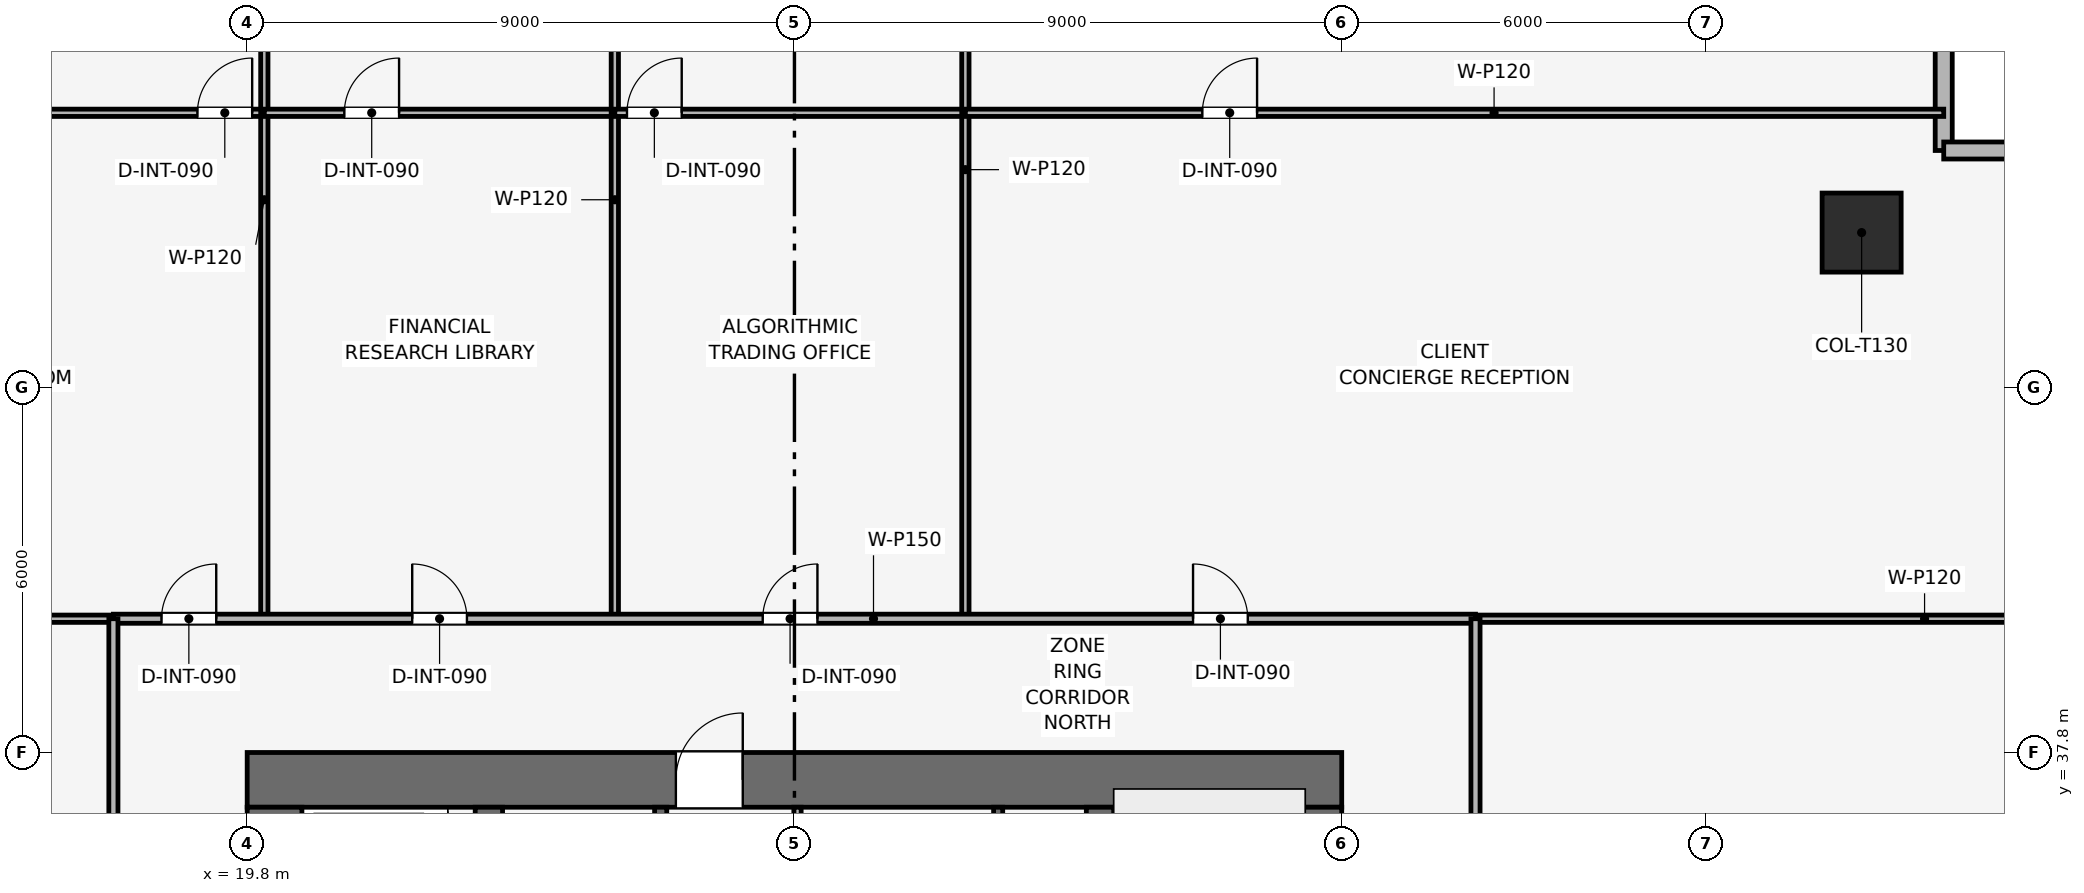
"""IFC4 building model, lengths in metres.
Left out: names, types, materials, properties, quantities, classifications, styles, units other than length and angle.
Written with IfcOpenShell. Run it as: python <this file> out.ifc"""

import sys

from ifc_helpers import new_model, si_unit, direction, frame, frame_2d, origin, origin_2d, place, context, subcontext, project, spatial, rectangle, extrude, element, fill, save


model = new_model("IFC4")
c1 = context("Model", 3, precision=1e-05, world=origin(), true_north=direction((0.0, 1.0)))
c2 = subcontext(c1, "Body", "Model", "MODEL_VIEW")
j1 = project(units=[si_unit("LENGTHUNIT", "METRE"), si_unit("PLANEANGLEUNIT", "RADIAN")], contexts=[c1])
p1 = place(None, origin())
s1 = spatial("IfcSite", under=j1, at=p1, CompositionType="ELEMENT")
p2 = place(p1, origin())
s2 = spatial("IfcBuilding", under=s1, at=p2, CompositionType="ELEMENT")
p3 = place(p2, frame((0.0, 0.0, 117.3)))
s3 = spatial("IfcBuildingStorey", under=s2, at=p3, CompositionType="ELEMENT", Elevation=117.3)
p4 = place(p3, frame((19.8, 37.35, 0.0), z_axis=(0.0, 0.0, 1.0), x_axis=(1.0, 0.0, 0.0)))
e1 = element("IfcWall", 1, at=p4, inside=s3, PredefinedType="SHEAR", context=c2, shape_type="SweptSolid", body=[
    extrude(rectangle(XDim=18.0, YDim=0.9, at=frame_2d((9.0, 0.0))), origin(), (0.0, 0.0, 1.0), 3.9),
])
p5 = place(p4, frame((7.05, 0.0, 0.0)))
e2 = element("IfcOpeningElement", 2, at=p5, cuts=e1, PredefinedType="OPENING", context=c2, shape_type="SweptSolid", body=[
    extrude(rectangle(XDim=1.1, YDim=2.15, at=frame_2d((0.55, 1.075))), frame((0.0, 0.46, 0.0), z_axis=(0.0, -1.0, 0.0), x_axis=(1.0, 0.0, 0.0)), (0.0, 0.0, 1.0), 0.92),
])
p6 = place(p3, frame((20.25, 20.7, 0.0), z_axis=(0.0, 0.0, 1.0), x_axis=(0.0, 1.0, 0.0)))
e3 = element("IfcWall", 3, at=p6, inside=s3, PredefinedType="SHEAR", context=c2, shape_type="SweptSolid", body=[
    extrude(rectangle(XDim=16.2, YDim=0.9, at=frame_2d((8.1, 0.0))), origin(), (0.0, 0.0, 1.0), 3.9),
])
p7 = place(p6, frame((10.1, 0.0, 0.0)))
e4 = element("IfcOpeningElement", 4, at=p7, cuts=e3, PredefinedType="OPENING", context=c2, shape_type="SweptSolid", body=[
    extrude(rectangle(XDim=1.1, YDim=2.15, at=frame_2d((0.55, 1.075))), frame((0.0, 0.46, 0.0), z_axis=(0.0, -1.0, 0.0), x_axis=(1.0, 0.0, 0.0)), (0.0, 0.0, 1.0), 0.92),
])
p8 = place(p3, frame((37.35, 20.7, 0.0), z_axis=(0.0, 0.0, 1.0), x_axis=(0.0, 1.0, 0.0)))
e5 = element("IfcWall", 5, at=p8, inside=s3, PredefinedType="SHEAR", context=c2, shape_type="SweptSolid", body=[
    extrude(rectangle(XDim=16.2, YDim=0.9, at=frame_2d((8.1, 0.0))), origin(), (0.0, 0.0, 1.0), 3.9),
])
p9 = place(p8, frame((4.6, 0.0, 0.0)))
e6 = element("IfcOpeningElement", 6, at=p9, cuts=e5, PredefinedType="OPENING", context=c2, shape_type="SweptSolid", body=[
    extrude(rectangle(XDim=1.1, YDim=2.15, at=frame_2d((0.55, 1.075))), frame((0.0, 0.46, 0.0), z_axis=(0.0, -1.0, 0.0), x_axis=(1.0, 0.0, 0.0)), (0.0, 0.0, 1.0), 0.92),
])
for number, where, z_axis, x_axis in (
    (7, (23.775, 20.7, 0.0), (0.0, 0.0, 1.0), (0.0, 1.0, 0.0)),
    (8, (33.825, 20.7, 0.0), (0.0, 0.0, 1.0), (0.0, 1.0, 0.0)),
):
    element("IfcWall", number, at=place(p3, frame(where, z_axis=z_axis, x_axis=x_axis)), inside=s3, PredefinedType="SHEAR", context=c2, shape_type="SweptSolid", body=[
        extrude(rectangle(XDim=16.2, YDim=0.45, at=frame_2d((8.1, 0.0))), origin(), (0.0, 0.0, 1.0), 3.9),
    ])
p10 = place(p3, frame((46.35, 46.35, 0.003), z_axis=(0.0, 0.0, 1.0), x_axis=(1.0, 0.0, 0.0)))
e9 = element("IfcColumn", 9, at=p10, inside=s3, PredefinedType="COLUMN", context=c2, shape_type="SweptSolid", body=[
    extrude(rectangle(XDim=1.3, YDim=1.3, at=origin_2d()), origin(), (0.0, 0.0, 1.0), 3.644),
])
p11 = place(p3, frame((47.7, 54.77, 0.0), z_axis=(0.0, 0.0, 1.0), x_axis=(0.0, -1.0, 0.0)))
e10 = element("IfcWall", 10, at=p11, inside=s3, PredefinedType="SOLIDWALL", context=c2, shape_type="SweptSolid", body=[
    extrude(rectangle(XDim=7.07, YDim=0.28, at=frame_2d((3.535, 0.0))), origin(), (0.0, 0.0, 1.0), 3.65),
])
p12 = place(p11, frame((2.285, 0.0, 0.9)))
e11 = element("IfcOpeningElement", 11, at=p12, cuts=e10, PredefinedType="OPENING", context=c2, shape_type="SweptSolid", body=[
    extrude(rectangle(XDim=2.5, YDim=1.9, at=frame_2d((1.25, 0.95))), frame((0.0, 0.15, 0.0), z_axis=(0.0, -1.0, 0.0), x_axis=(1.0, 0.0, 0.0)), (0.0, 0.0, 1.0), 0.3),
])
p13 = place(p3, frame((47.7, 47.7, 0.0), z_axis=(0.0, 0.0, 1.0), x_axis=(1.0, 0.0, 0.0)))
e12 = element("IfcWall", 12, at=p13, inside=s3, PredefinedType="SOLIDWALL", context=c2, shape_type="SweptSolid", body=[
    extrude(rectangle(XDim=7.07, YDim=0.28, at=frame_2d((3.535, 0.0))), origin(), (0.0, 0.0, 1.0), 3.65),
])
p14 = place(p13, frame((2.285, 0.0, 0.9)))
e13 = element("IfcOpeningElement", 13, at=p14, cuts=e12, PredefinedType="OPENING", context=c2, shape_type="SweptSolid", body=[
    extrude(rectangle(XDim=2.5, YDim=1.9, at=frame_2d((1.25, 0.95))), frame((0.0, 0.15, 0.0), z_axis=(0.0, -1.0, 0.0), x_axis=(1.0, 0.0, 0.0)), (0.0, 0.0, 1.0), 0.3),
])
p15 = place(p3, frame((32.15, 34.0, 0.0), z_axis=(0.0, 0.0, 1.0), x_axis=(0.0, 1.0, 0.0)))
e14 = element("IfcWall", 14, at=p15, inside=s3, PredefinedType="SHEAR", context=c2, shape_type="SweptSolid", body=[
    extrude(rectangle(XDim=2.9, YDim=0.15, at=frame_2d((1.45, 0.0))), origin(), (0.0, 0.0, 1.0), 3.65),
])
p16 = place(p3, frame((26.6, 34.0, 0.0), z_axis=(0.0, 0.0, 1.0), x_axis=(0.0, 1.0, 0.0)))
e15 = element("IfcWall", 15, at=p16, inside=s3, PredefinedType="SHEAR", context=c2, shape_type="SweptSolid", body=[
    extrude(rectangle(XDim=2.9, YDim=0.2, at=frame_2d((1.45, 0.0))), origin(), (0.0, 0.0, 1.0), 3.65),
])
p17 = place(p16, frame((0.75, 0.0, 0.0)))
e16 = element("IfcOpeningElement", 16, at=p17, cuts=e15, PredefinedType="OPENING", context=c2, shape_type="SweptSolid", body=[
    extrude(rectangle(XDim=1.1, YDim=2.15, at=frame_2d((0.55, 1.075))), frame((0.0, 0.11, 0.0), z_axis=(0.0, -1.0, 0.0), x_axis=(1.0, 0.0, 0.0)), (0.0, 0.0, 1.0), 0.22),
])
p18 = place(p3, frame((28.85, 33.925, 0.0), z_axis=(0.0, 0.0, 1.0), x_axis=(0.0, 1.0, 0.0)))
e17 = element("IfcWall", 17, at=p18, inside=s3, PredefinedType="PARTITIONING", context=c2, shape_type="SweptSolid", body=[
    extrude(rectangle(XDim=2.975, YDim=0.12, at=frame_2d((1.487, 0.0))), origin(), (0.0, 0.0, 1.0), 3.65),
])
p19 = place(p18, frame((0.25, 0.0, 0.0)))
e18 = element("IfcOpeningElement", 18, at=p19, cuts=e17, PredefinedType="OPENING", context=c2, shape_type="SweptSolid", body=[
    extrude(rectangle(XDim=0.85, YDim=2.1, at=frame_2d((0.425, 1.05))), frame((0.0, 0.07, 0.0), z_axis=(0.0, -1.0, 0.0), x_axis=(1.0, 0.0, 0.0)), (0.0, 0.0, 1.0), 0.14),
])
p20 = place(p18, frame((1.645, 0.0, 0.0)))
e19 = element("IfcOpeningElement", 19, at=p20, cuts=e17, PredefinedType="OPENING", context=c2, shape_type="SweptSolid", body=[
    extrude(rectangle(XDim=0.85, YDim=2.1, at=frame_2d((0.425, 1.05))), frame((0.0, 0.07, 0.0), z_axis=(0.0, -1.0, 0.0), x_axis=(1.0, 0.0, 0.0)), (0.0, 0.0, 1.0), 0.14),
])
p21 = place(p3, frame((9.9, 48.32, 0.0), z_axis=(0.0, 0.0, 1.0), x_axis=(1.0, 0.0, 0.0)))
e20 = element("IfcWall", 20, at=p21, inside=s3, PredefinedType="PARTITIONING", context=c2, shape_type="SweptSolid", body=[
    extrude(rectangle(XDim=10.182, YDim=0.12, at=frame_2d((5.091, 0.0))), origin(), (0.0, 0.0, 1.0), 3.035),
])
p22 = place(p21, frame((9.082, 0.0, 0.0)))
e21 = element("IfcOpeningElement", 21, at=p22, cuts=e20, PredefinedType="OPENING", context=c2, shape_type="SweptSolid", body=[
    extrude(rectangle(XDim=0.9, YDim=2.1, at=frame_2d((0.45, 1.05))), frame((0.0, 0.07, 0.0), z_axis=(0.0, -1.0, 0.0), x_axis=(1.0, 0.0, 0.0)), (0.0, 0.0, 1.0), 0.14),
])
p23 = place(p3, frame((20.082, 40.0, 0.0), z_axis=(0.0, 0.0, 1.0), x_axis=(0.0, 1.0, 0.0)))
e22 = element("IfcWall", 22, at=p23, inside=s3, PredefinedType="PARTITIONING", context=c2, shape_type="SweptSolid", body=[
    extrude(rectangle(XDim=14.77, YDim=0.12, at=frame_2d((7.385, 0.0))), origin(), (0.0, 0.0, 1.0), 3.035),
])
p24 = place(p3, frame((20.082, 48.32, 0.0), z_axis=(0.0, 0.0, 1.0), x_axis=(1.0, 0.0, 0.0)))
e23 = element("IfcWall", 23, at=p24, inside=s3, PredefinedType="PARTITIONING", context=c2, shape_type="SweptSolid", body=[
    extrude(rectangle(XDim=5.764, YDim=0.12, at=frame_2d((2.882, 0.0))), origin(), (0.0, 0.0, 1.0), 3.185),
])
p25 = place(p24, frame((1.316, 0.0, 0.0)))
e24 = element("IfcOpeningElement", 24, at=p25, cuts=e23, PredefinedType="OPENING", context=c2, shape_type="SweptSolid", body=[
    extrude(rectangle(XDim=0.9, YDim=2.1, at=frame_2d((0.45, 1.05))), frame((0.0, 0.07, 0.0), z_axis=(0.0, -1.0, 0.0), x_axis=(1.0, 0.0, 0.0)), (0.0, 0.0, 1.0), 0.14),
])
p26 = place(p3, frame((25.846, 40.0, 0.0), z_axis=(0.0, 0.0, 1.0), x_axis=(0.0, 1.0, 0.0)))
e25 = element("IfcWall", 25, at=p26, inside=s3, PredefinedType="PARTITIONING", context=c2, shape_type="SweptSolid", body=[
    extrude(rectangle(XDim=14.77, YDim=0.12, at=frame_2d((7.385, 0.0))), origin(), (0.0, 0.0, 1.0), 3.035),
])
p27 = place(p3, frame((25.846, 48.32, 0.0), z_axis=(0.0, 0.0, 1.0), x_axis=(1.0, 0.0, 0.0)))
e26 = element("IfcWall", 26, at=p27, inside=s3, PredefinedType="PARTITIONING", context=c2, shape_type="SweptSolid", body=[
    extrude(rectangle(XDim=5.765, YDim=0.12, at=frame_2d((2.883, 0.0))), origin(), (0.0, 0.0, 1.0), 3.185),
])
p28 = place(p27, frame((0.2, 0.0, 0.0)))
e27 = element("IfcOpeningElement", 27, at=p28, cuts=e26, PredefinedType="OPENING", context=c2, shape_type="SweptSolid", body=[
    extrude(rectangle(XDim=0.9, YDim=2.1, at=frame_2d((0.45, 1.05))), frame((0.0, 0.07, 0.0), z_axis=(0.0, -1.0, 0.0), x_axis=(1.0, 0.0, 0.0)), (0.0, 0.0, 1.0), 0.14),
])
p29 = place(p3, frame((31.611, 40.0, 0.0), z_axis=(0.0, 0.0, 1.0), x_axis=(0.0, 1.0, 0.0)))
e28 = element("IfcWall", 28, at=p29, inside=s3, PredefinedType="PARTITIONING", context=c2, shape_type="SweptSolid", body=[
    extrude(rectangle(XDim=14.77, YDim=0.12, at=frame_2d((7.385, 0.0))), origin(), (0.0, 0.0, 1.0), 3.035),
])
p30 = place(p3, frame((31.611, 48.32, 0.0), z_axis=(0.0, 0.0, 1.0), x_axis=(1.0, 0.0, 0.0)))
e29 = element("IfcWall", 29, at=p30, inside=s3, PredefinedType="PARTITIONING", context=c2, shape_type="SweptSolid", body=[
    extrude(rectangle(XDim=16.089, YDim=0.12, at=frame_2d((8.044, 0.0))), origin(), (0.0, 0.0, 1.0), 3.035),
])
p31 = place(p30, frame((3.897, 0.0, 0.0)))
e30 = element("IfcOpeningElement", 30, at=p31, cuts=e29, PredefinedType="OPENING", context=c2, shape_type="SweptSolid", body=[
    extrude(rectangle(XDim=0.9, YDim=2.1, at=frame_2d((0.45, 1.05))), frame((0.0, 0.07, 0.0), z_axis=(0.0, -1.0, 0.0), x_axis=(1.0, 0.0, 0.0)), (0.0, 0.0, 1.0), 0.14),
])
for number, where, z_axis, x_axis in (
    (31, (2.83, 40.0, 0.0), (0.0, 0.0, 1.0), (1.0, 0.0, 0.0)),
    (32, (40.0, 40.0, 0.0), (0.0, 0.0, 1.0), (1.0, 0.0, 0.0)),
):
    element("IfcWall", number, at=place(p3, frame(where, z_axis=z_axis, x_axis=x_axis)), inside=s3, PredefinedType="PARTITIONING", context=c2, shape_type="SweptSolid", body=[
        extrude(rectangle(XDim=14.77, YDim=0.12, at=frame_2d((7.385, 0.0))), origin(), (0.0, 0.0, 1.0), 3.035),
    ])
p32 = place(p3, frame((17.6, 40.0, 0.0), z_axis=(0.0, 0.0, 1.0), x_axis=(1.0, 0.0, 0.0)))
e33 = element("IfcWall", 33, at=p32, inside=s3, PredefinedType="PARTITIONING", context=c2, shape_type="SweptSolid", body=[
    extrude(rectangle(XDim=22.4, YDim=0.15, at=frame_2d((11.2, 0.0))), origin(), (0.0, 0.0, 1.0), 3.185),
])
p33 = place(p32, frame((0.791, 0.0, 0.0)))
e34 = element("IfcOpeningElement", 34, at=p33, cuts=e33, PredefinedType="OPENING", context=c2, shape_type="SweptSolid", body=[
    extrude(rectangle(XDim=0.9, YDim=2.1, at=frame_2d((0.45, 1.05))), frame((0.0, 0.085, 0.0), z_axis=(0.0, -1.0, 0.0), x_axis=(1.0, 0.0, 0.0)), (0.0, 0.0, 1.0), 0.17),
])
p34 = place(p32, frame((4.914, 0.0, 0.0)))
e35 = element("IfcOpeningElement", 35, at=p34, cuts=e33, PredefinedType="OPENING", context=c2, shape_type="SweptSolid", body=[
    extrude(rectangle(XDim=0.9, YDim=2.1, at=frame_2d((0.45, 1.05))), frame((0.0, 0.085, 0.0), z_axis=(0.0, -1.0, 0.0), x_axis=(1.0, 0.0, 0.0)), (0.0, 0.0, 1.0), 0.17),
])
p35 = place(p32, frame((10.678, 0.0, 0.0)))
e36 = element("IfcOpeningElement", 36, at=p35, cuts=e33, PredefinedType="OPENING", context=c2, shape_type="SweptSolid", body=[
    extrude(rectangle(XDim=0.9, YDim=2.1, at=frame_2d((0.45, 1.05))), frame((0.0, 0.085, 0.0), z_axis=(0.0, -1.0, 0.0), x_axis=(1.0, 0.0, 0.0)), (0.0, 0.0, 1.0), 0.17),
])
p36 = place(p32, frame((17.755, 0.0, 0.0)))
e37 = element("IfcOpeningElement", 37, at=p36, cuts=e33, PredefinedType="OPENING", context=c2, shape_type="SweptSolid", body=[
    extrude(rectangle(XDim=0.9, YDim=2.1, at=frame_2d((0.45, 1.05))), frame((0.0, 0.085, 0.0), z_axis=(0.0, -1.0, 0.0), x_axis=(1.0, 0.0, 0.0)), (0.0, 0.0, 1.0), 0.17),
])
p37 = place(p3, frame((17.6, 17.6, 0.0), z_axis=(0.0, 0.0, 1.0), x_axis=(0.0, 1.0, 0.0)))
e38 = element("IfcWall", 38, at=p37, inside=s3, PredefinedType="PARTITIONING", context=c2, shape_type="SweptSolid", body=[
    extrude(rectangle(XDim=22.4, YDim=0.15, at=frame_2d((11.2, 0.0))), origin(), (0.0, 0.0, 1.0), 3.185),
])
p38 = place(p37, frame((10.75, 0.0, 0.0)))
e39 = element("IfcOpeningElement", 39, at=p38, cuts=e38, PredefinedType="OPENING", context=c2, shape_type="SweptSolid", body=[
    extrude(rectangle(XDim=0.9, YDim=2.1, at=frame_2d((0.45, 1.05))), frame((0.0, 0.085, 0.0), z_axis=(0.0, -1.0, 0.0), x_axis=(1.0, 0.0, 0.0)), (0.0, 0.0, 1.0), 0.17),
])
p39 = place(p3, frame((40.0, 17.6, 0.0), z_axis=(0.0, 0.0, 1.0), x_axis=(0.0, 1.0, 0.0)))
e40 = element("IfcWall", 40, at=p39, inside=s3, PredefinedType="PARTITIONING", context=c2, shape_type="SweptSolid", body=[
    extrude(rectangle(XDim=22.4, YDim=0.15, at=frame_2d((11.2, 0.0))), origin(), (0.0, 0.0, 1.0), 3.185),
])
p40 = place(p39, frame((1.95, 0.0, 0.0)))
e41 = element("IfcOpeningElement", 41, at=p40, cuts=e40, PredefinedType="OPENING", context=c2, shape_type="SweptSolid", body=[
    extrude(rectangle(XDim=0.9, YDim=2.1, at=frame_2d((0.45, 1.05))), frame((0.0, 0.085, 0.0), z_axis=(0.0, -1.0, 0.0), x_axis=(1.0, 0.0, 0.0)), (0.0, 0.0, 1.0), 0.17),
])
p41 = place(p39, frame((5.75, 0.0, 0.0)))
e42 = element("IfcOpeningElement", 42, at=p41, cuts=e40, PredefinedType="OPENING", context=c2, shape_type="SweptSolid", body=[
    extrude(rectangle(XDim=0.9, YDim=2.1, at=frame_2d((0.45, 1.05))), frame((0.0, 0.085, 0.0), z_axis=(0.0, -1.0, 0.0), x_axis=(1.0, 0.0, 0.0)), (0.0, 0.0, 1.0), 0.17),
])
p42 = place(p39, frame((8.65, 0.0, 0.0)))
e43 = element("IfcOpeningElement", 43, at=p42, cuts=e40, PredefinedType="OPENING", context=c2, shape_type="SweptSolid", body=[
    extrude(rectangle(XDim=0.9, YDim=2.1, at=frame_2d((0.45, 1.05))), frame((0.0, 0.085, 0.0), z_axis=(0.0, -1.0, 0.0), x_axis=(1.0, 0.0, 0.0)), (0.0, 0.0, 1.0), 0.17),
])
p43 = place(p39, frame((11.4, 0.0, 0.0)))
e44 = element("IfcOpeningElement", 44, at=p43, cuts=e40, PredefinedType="OPENING", context=c2, shape_type="SweptSolid", body=[
    extrude(rectangle(XDim=0.95, YDim=2.1, at=frame_2d((0.475, 1.05))), frame((0.0, 0.085, 0.0), z_axis=(0.0, -1.0, 0.0), x_axis=(1.0, 0.0, 0.0)), (0.0, 0.0, 1.0), 0.17),
])
p44 = place(p39, frame((17.35, 0.0, 0.0)))
e45 = element("IfcOpeningElement", 45, at=p44, cuts=e40, PredefinedType="OPENING", context=c2, shape_type="SweptSolid", body=[
    extrude(rectangle(XDim=0.9, YDim=2.1, at=frame_2d((0.45, 1.05))), frame((0.0, 0.085, 0.0), z_axis=(0.0, -1.0, 0.0), x_axis=(1.0, 0.0, 0.0)), (0.0, 0.0, 1.0), 0.17),
])
p45 = place(p22, origin())
e46 = element("IfcDoor", 46, at=p45, inside=s3, OperationType="SINGLE_SWING_RIGHT", PredefinedType="DOOR", context=c2, shape_type="SweptSolid", body=[
    extrude(rectangle(XDim=0.9, YDim=2.1, at=frame_2d((0.45, 1.05))), frame((0.0, 0.025, 0.0), z_axis=(0.0, -1.0, 0.0), x_axis=(1.0, 0.0, 0.0)), (0.0, 0.0, 1.0), 0.05),
])
fill(e21, e46)
p46 = place(p25, origin())
e47 = element("IfcDoor", 47, at=p46, inside=s3, OperationType="SINGLE_SWING_RIGHT", PredefinedType="DOOR", context=c2, shape_type="SweptSolid", body=[
    extrude(rectangle(XDim=0.9, YDim=2.1, at=frame_2d((0.45, 1.05))), frame((0.0, 0.025, 0.0), z_axis=(0.0, -1.0, 0.0), x_axis=(1.0, 0.0, 0.0)), (0.0, 0.0, 1.0), 0.05),
])
fill(e24, e47)
p47 = place(p28, origin())
e48 = element("IfcDoor", 48, at=p47, inside=s3, OperationType="SINGLE_SWING_RIGHT", PredefinedType="DOOR", context=c2, shape_type="SweptSolid", body=[
    extrude(rectangle(XDim=0.9, YDim=2.1, at=frame_2d((0.45, 1.05))), frame((0.0, 0.025, 0.0), z_axis=(0.0, -1.0, 0.0), x_axis=(1.0, 0.0, 0.0)), (0.0, 0.0, 1.0), 0.05),
])
fill(e27, e48)
p48 = place(p31, origin())
e49 = element("IfcDoor", 49, at=p48, inside=s3, OperationType="SINGLE_SWING_RIGHT", PredefinedType="DOOR", context=c2, shape_type="SweptSolid", body=[
    extrude(rectangle(XDim=0.9, YDim=2.1, at=frame_2d((0.45, 1.05))), frame((0.0, 0.025, 0.0), z_axis=(0.0, -1.0, 0.0), x_axis=(1.0, 0.0, 0.0)), (0.0, 0.0, 1.0), 0.05),
])
fill(e30, e49)
p49 = place(p33, origin())
e50 = element("IfcDoor", 50, at=p49, inside=s3, OperationType="SINGLE_SWING_RIGHT", PredefinedType="DOOR", context=c2, shape_type="SweptSolid", body=[
    extrude(rectangle(XDim=0.9, YDim=2.1, at=frame_2d((0.45, 1.05))), frame((0.0, 0.025, 0.0), z_axis=(0.0, -1.0, 0.0), x_axis=(1.0, 0.0, 0.0)), (0.0, 0.0, 1.0), 0.05),
])
fill(e34, e50)
p50 = place(p34, origin())
e51 = element("IfcDoor", 51, at=p50, inside=s3, OperationType="SINGLE_SWING_LEFT", PredefinedType="DOOR", context=c2, shape_type="SweptSolid", body=[
    extrude(rectangle(XDim=0.9, YDim=2.1, at=frame_2d((0.45, 1.05))), frame((0.0, 0.025, 0.0), z_axis=(0.0, -1.0, 0.0), x_axis=(1.0, 0.0, 0.0)), (0.0, 0.0, 1.0), 0.05),
])
fill(e35, e51)
p51 = place(p35, origin())
e52 = element("IfcDoor", 52, at=p51, inside=s3, OperationType="SINGLE_SWING_RIGHT", PredefinedType="DOOR", context=c2, shape_type="SweptSolid", body=[
    extrude(rectangle(XDim=0.9, YDim=2.1, at=frame_2d((0.45, 1.05))), frame((0.0, 0.025, 0.0), z_axis=(0.0, -1.0, 0.0), x_axis=(1.0, 0.0, 0.0)), (0.0, 0.0, 1.0), 0.05),
])
fill(e36, e52)
p52 = place(p36, origin())
e53 = element("IfcDoor", 53, at=p52, inside=s3, OperationType="SINGLE_SWING_LEFT", PredefinedType="DOOR", context=c2, shape_type="SweptSolid", body=[
    extrude(rectangle(XDim=0.9, YDim=2.1, at=frame_2d((0.45, 1.05))), frame((0.0, 0.025, 0.0), z_axis=(0.0, -1.0, 0.0), x_axis=(1.0, 0.0, 0.0)), (0.0, 0.0, 1.0), 0.05),
])
fill(e37, e53)
p53 = place(p5, origin())
e54 = element("IfcDoor", 54, at=p53, inside=s3, OperationType="SINGLE_SWING_RIGHT", PredefinedType="DOOR", context=c2, shape_type="SweptSolid", body=[
    extrude(rectangle(XDim=1.1, YDim=2.15, at=frame_2d((0.55, 1.075))), frame((0.0, 0.025, 0.0), z_axis=(0.0, -1.0, 0.0), x_axis=(1.0, 0.0, 0.0)), (0.0, 0.0, 1.0), 0.05),
])
fill(e2, e54)
save(model, sys.argv[1])
